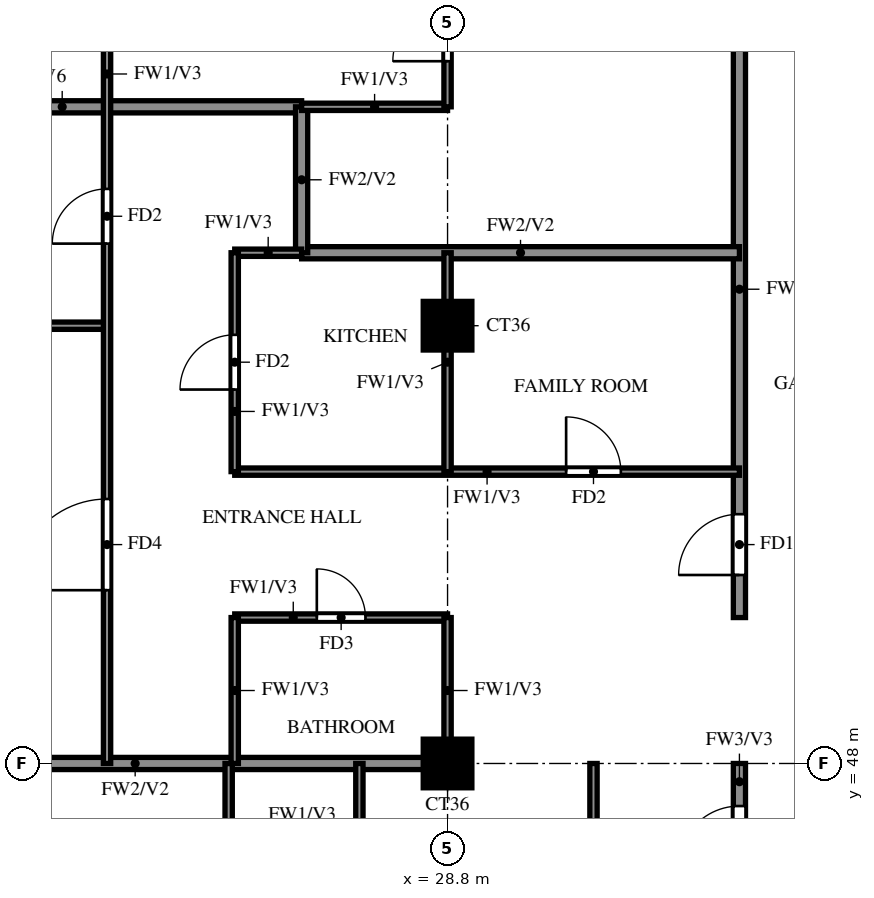
"""IFC4 building model, lengths in metres.
Left out: names, types, materials, properties, quantities, classifications, styles, units other than length and angle.
Written with IfcOpenShell. Run it as: python <this file> out.ifc"""

import sys

from ifc_helpers import new_model, si_unit, direction, frame, frame_2d, origin, origin_2d, place, context, subcontext, project, spatial, rectangle, extrude, source, transform, mapped, element, fill, save


model = new_model("IFC4")
c1 = context("Model", 3, precision=1e-05, world=origin(), true_north=direction((0.0, 1.0)))
c2 = subcontext(c1, "Body", "Model", "MODEL_VIEW")
j1 = project(units=[si_unit("LENGTHUNIT", "METRE"), si_unit("PLANEANGLEUNIT", "RADIAN")], contexts=[c1])
p1 = place(None, origin())
s1 = spatial("IfcSite", under=j1, at=p1, CompositionType="ELEMENT")
p2 = place(p1, origin())
s2 = spatial("IfcBuilding", under=s1, at=p2, CompositionType="ELEMENT")
p3 = place(p2, frame((0.0, 0.0, 232.5)))
s3 = spatial("IfcBuildingStorey", under=s2, at=p3, CompositionType="ELEMENT", Elevation=232.5)
m1 = source(origin(), c2, "Body", "SweptSolid", [
    extrude(rectangle(XDim=0.8, YDim=0.8, at=origin_2d()), origin(), (0.0, 0.0, 1.0), 3.22),
])
for number, where, z_axis, x_axis in (
    (1, (28.8, 48.0, 0.0), (0.0, 0.0, 1.0), (1.0, 0.0, 0.0)),
    (2, (28.8, 55.2, 0.0), (0.0, 0.0, 1.0), (1.0, 0.0, 0.0)),
):
    element("IfcColumn", number, at=place(p3, frame(where, z_axis=z_axis, x_axis=x_axis)), inside=s3, PredefinedType="COLUMN", context=c2, shape_type="MappedRepresentation", body=[
        mapped(m1, transform((0.0, 0.0, 0.0))),
    ])
p4 = place(p3, frame((33.6, 45.6, 0.0), z_axis=(0.0, 0.0, 1.0), x_axis=(0.0, 1.0, 0.0)))
e3 = element("IfcWall", 3, at=p4, inside=s3, PredefinedType="SOLIDWALL", context=c2, shape_type="SweptSolid", body=[
    extrude(rectangle(XDim=2.4, YDim=0.2, at=frame_2d((1.2, 0.0))), origin(), (0.0, 0.0, 1.0), 3.22),
])
p5 = place(p4, frame((0.7, 0.0, 0.0)))
e4 = element("IfcOpeningElement", 4, at=p5, cuts=e3, PredefinedType="OPENING", context=c2, shape_type="SweptSolid", body=[
    extrude(rectangle(XDim=1.0, YDim=2.1, at=frame_2d((0.5, 1.05))), frame((0.0, 0.11, 0.0), z_axis=(0.0, -1.0, 0.0), x_axis=(1.0, 0.0, 0.0)), (0.0, 0.0, 1.0), 0.22),
])
p6 = place(p3, frame((33.6, 50.4, 0.0), z_axis=(0.0, 0.0, 1.0), x_axis=(0.0, 1.0, 0.0)))
e5 = element("IfcWall", 5, at=p6, inside=s3, PredefinedType="SOLIDWALL", context=c2, shape_type="SweptSolid", body=[
    extrude(rectangle(XDim=12.0, YDim=0.2, at=frame_2d((6.0, 0.0))), origin(), (0.0, 0.0, 1.0), 3.22),
])
p7 = place(p6, frame((0.7, 0.0, 0.0)))
e6 = element("IfcOpeningElement", 6, at=p7, cuts=e5, PredefinedType="OPENING", context=c2, shape_type="SweptSolid", body=[
    extrude(rectangle(XDim=1.0, YDim=2.1, at=frame_2d((0.5, 1.05))), frame((0.0, 0.11, 0.0), z_axis=(0.0, -1.0, 0.0), x_axis=(1.0, 0.0, 0.0)), (0.0, 0.0, 1.0), 0.22),
])
p8 = place(p6, frame((9.7, 0.0, 0.0)))
e7 = element("IfcOpeningElement", 7, at=p8, cuts=e5, PredefinedType="OPENING", context=c2, shape_type="SweptSolid", body=[
    extrude(rectangle(XDim=1.0, YDim=2.1, at=frame_2d((0.5, 1.05))), frame((0.0, 0.11, 0.0), z_axis=(0.0, -1.0, 0.0), x_axis=(1.0, 0.0, 0.0)), (0.0, 0.0, 1.0), 0.22),
])
p9 = place(p3, frame((18.525, 48.0, 0.0), z_axis=(0.0, 0.0, 1.0), x_axis=(1.0, 0.0, 0.0)))
e8 = element("IfcWall", 8, at=p9, inside=s3, PredefinedType="SOLIDWALL", context=c2, shape_type="SweptSolid", body=[
    extrude(rectangle(XDim=10.275, YDim=0.2, at=frame_2d((5.138, 0.0))), origin(), (0.0, 0.0, 1.0), 3.22),
])
p10 = place(p3, frame((26.4, 56.4, 0.0), z_axis=(0.0, 0.0, 1.0), x_axis=(1.0, 0.0, 0.0)))
e9 = element("IfcWall", 9, at=p10, inside=s3, PredefinedType="SOLIDWALL", context=c2, shape_type="SweptSolid", body=[
    extrude(rectangle(XDim=7.2, YDim=0.2, at=frame_2d((3.6, 0.0))), origin(), (0.0, 0.0, 1.0), 3.22),
])
p11 = place(p3, frame((18.525, 58.8, 0.0), z_axis=(0.0, 0.0, 1.0), x_axis=(1.0, 0.0, 0.0)))
e10 = element("IfcWall", 10, at=p11, inside=s3, PredefinedType="SOLIDWALL", context=c2, shape_type="SweptSolid", body=[
    extrude(rectangle(XDim=7.875, YDim=0.2, at=frame_2d((3.938, 0.0))), origin(), (0.0, 0.0, 1.0), 2.32),
])
p12 = place(p3, frame((26.4, 56.4, 0.0), z_axis=(0.0, 0.0, 1.0), x_axis=(0.0, 1.0, 0.0)))
e11 = element("IfcWall", 11, at=p12, inside=s3, PredefinedType="SOLIDWALL", context=c2, shape_type="SweptSolid", body=[
    extrude(rectangle(XDim=2.4, YDim=0.2, at=frame_2d((1.2, 0.0))), origin(), (0.0, 0.0, 1.0), 3.22),
])
p13 = place(p3, frame((25.3, 50.4, 0.0), z_axis=(0.0, 0.0, 1.0), x_axis=(1.0, 0.0, 0.0)))
e12 = element("IfcWall", 12, at=p13, inside=s3, PredefinedType="PARTITIONING", context=c2, shape_type="SweptSolid", body=[
    extrude(rectangle(XDim=3.5, YDim=0.12, at=frame_2d((1.75, 0.0))), origin(), (0.0, 0.0, 1.0), 3.22),
])
p14 = place(p13, frame((1.35, 0.0, 0.0)))
e13 = element("IfcOpeningElement", 13, at=p14, cuts=e12, PredefinedType="OPENING", context=c2, shape_type="SweptSolid", body=[
    extrude(rectangle(XDim=0.8, YDim=2.1, at=frame_2d((0.4, 1.05))), frame((0.0, 0.07, 0.0), z_axis=(0.0, -1.0, 0.0), x_axis=(1.0, 0.0, 0.0)), (0.0, 0.0, 1.0), 0.14),
])
p15 = place(p3, frame((25.3, 52.8, 0.0), z_axis=(0.0, 0.0, 1.0), x_axis=(1.0, 0.0, 0.0)))
e14 = element("IfcWall", 14, at=p15, inside=s3, PredefinedType="PARTITIONING", context=c2, shape_type="SweptSolid", body=[
    extrude(rectangle(XDim=8.3, YDim=0.12, at=frame_2d((4.15, 0.0))), origin(), (0.0, 0.0, 1.0), 3.22),
])
p16 = place(p15, frame((5.45, 0.0, 0.0)))
e15 = element("IfcOpeningElement", 15, at=p16, cuts=e14, PredefinedType="OPENING", context=c2, shape_type="SweptSolid", body=[
    extrude(rectangle(XDim=0.9, YDim=2.1, at=frame_2d((0.45, 1.05))), frame((0.0, 0.07, 0.0), z_axis=(0.0, -1.0, 0.0), x_axis=(1.0, 0.0, 0.0)), (0.0, 0.0, 1.0), 0.14),
])
p17 = place(p3, frame((18.525, 55.2, 0.0), z_axis=(0.0, 0.0, 1.0), x_axis=(1.0, 0.0, 0.0)))
e16 = element("IfcWall", 16, at=p17, inside=s3, PredefinedType="PARTITIONING", context=c2, shape_type="SweptSolid", body=[
    extrude(rectangle(XDim=4.675, YDim=0.12, at=frame_2d((2.337, 0.0))), origin(), (0.0, 0.0, 1.0), 3.22),
])
p18 = place(p3, frame((25.3, 56.4, 0.0), z_axis=(0.0, 0.0, 1.0), x_axis=(1.0, 0.0, 0.0)))
e17 = element("IfcWall", 17, at=p18, inside=s3, PredefinedType="PARTITIONING", context=c2, shape_type="SweptSolid", body=[
    extrude(rectangle(XDim=1.1, YDim=0.12, at=frame_2d((0.55, 0.0))), origin(), (0.0, 0.0, 1.0), 3.22),
])
p19 = place(p3, frame((26.4, 58.8, 0.0), z_axis=(0.0, 0.0, 1.0), x_axis=(1.0, 0.0, 0.0)))
e18 = element("IfcWall", 18, at=p19, inside=s3, PredefinedType="PARTITIONING", context=c2, shape_type="SweptSolid", body=[
    extrude(rectangle(XDim=2.4, YDim=0.12, at=frame_2d((1.2, 0.0))), origin(), (0.0, 0.0, 1.0), 3.22),
])
p20 = place(p3, frame((23.2, 48.0, 0.0), z_axis=(0.0, 0.0, 1.0), x_axis=(0.0, 1.0, 0.0)))
e19 = element("IfcWall", 19, at=p20, inside=s3, PredefinedType="PARTITIONING", context=c2, shape_type="SweptSolid", body=[
    extrude(rectangle(XDim=25.2, YDim=0.12, at=frame_2d((12.6, 0.0))), origin(), (0.0, 0.0, 1.0), 3.22),
])
p21 = place(p20, frame((2.85, 0.0, 0.0)))
e20 = element("IfcOpeningElement", 20, at=p21, cuts=e19, PredefinedType="OPENING", context=c2, shape_type="SweptSolid", body=[
    extrude(rectangle(XDim=1.5, YDim=2.1, at=frame_2d((0.75, 1.05))), frame((0.0, 0.07, 0.0), z_axis=(0.0, -1.0, 0.0), x_axis=(1.0, 0.0, 0.0)), (0.0, 0.0, 1.0), 0.14),
])
p22 = place(p20, frame((8.55, 0.0, 0.0)))
e21 = element("IfcOpeningElement", 21, at=p22, cuts=e19, PredefinedType="OPENING", context=c2, shape_type="SweptSolid", body=[
    extrude(rectangle(XDim=0.9, YDim=2.1, at=frame_2d((0.45, 1.05))), frame((0.0, 0.07, 0.0), z_axis=(0.0, -1.0, 0.0), x_axis=(1.0, 0.0, 0.0)), (0.0, 0.0, 1.0), 0.14),
])
p23 = place(p20, frame((12.15, 0.0, 0.0)))
e22 = element("IfcOpeningElement", 22, at=p23, cuts=e19, PredefinedType="OPENING", context=c2, shape_type="SweptSolid", body=[
    extrude(rectangle(XDim=0.9, YDim=2.1, at=frame_2d((0.45, 1.05))), frame((0.0, 0.07, 0.0), z_axis=(0.0, -1.0, 0.0), x_axis=(1.0, 0.0, 0.0)), (0.0, 0.0, 1.0), 0.14),
])
p24 = place(p20, frame((15.75, 0.0, 0.0)))
e23 = element("IfcOpeningElement", 23, at=p24, cuts=e19, PredefinedType="OPENING", context=c2, shape_type="SweptSolid", body=[
    extrude(rectangle(XDim=0.9, YDim=2.1, at=frame_2d((0.45, 1.05))), frame((0.0, 0.07, 0.0), z_axis=(0.0, -1.0, 0.0), x_axis=(1.0, 0.0, 0.0)), (0.0, 0.0, 1.0), 0.14),
])
p25 = place(p20, frame((19.35, 0.0, 0.0)))
e24 = element("IfcOpeningElement", 24, at=p25, cuts=e19, PredefinedType="OPENING", context=c2, shape_type="SweptSolid", body=[
    extrude(rectangle(XDim=0.9, YDim=2.1, at=frame_2d((0.45, 1.05))), frame((0.0, 0.07, 0.0), z_axis=(0.0, -1.0, 0.0), x_axis=(1.0, 0.0, 0.0)), (0.0, 0.0, 1.0), 0.14),
])
p26 = place(p20, frame((22.95, 0.0, 0.0)))
e25 = element("IfcOpeningElement", 25, at=p26, cuts=e19, PredefinedType="OPENING", context=c2, shape_type="SweptSolid", body=[
    extrude(rectangle(XDim=0.9, YDim=2.1, at=frame_2d((0.45, 1.05))), frame((0.0, 0.07, 0.0), z_axis=(0.0, -1.0, 0.0), x_axis=(1.0, 0.0, 0.0)), (0.0, 0.0, 1.0), 0.14),
])
p27 = place(p3, frame((25.2, 39.725, 0.0), z_axis=(0.0, 0.0, 1.0), x_axis=(0.0, 1.0, 0.0)))
e26 = element("IfcWall", 26, at=p27, inside=s3, PredefinedType="PARTITIONING", context=c2, shape_type="SweptSolid", body=[
    extrude(rectangle(XDim=8.275, YDim=0.12, at=frame_2d((4.137, 0.0))), origin(), (0.0, 0.0, 1.0), 3.22),
])
p28 = place(p27, frame((4.525, 0.0, 0.0)))
e27 = element("IfcOpeningElement", 27, at=p28, cuts=e26, PredefinedType="OPENING", context=c2, shape_type="SweptSolid", body=[
    extrude(rectangle(XDim=0.9, YDim=2.1, at=frame_2d((0.45, 1.05))), frame((0.0, 0.07, 0.0), z_axis=(0.0, -1.0, 0.0), x_axis=(1.0, 0.0, 0.0)), (0.0, 0.0, 1.0), 0.14),
])
p29 = place(p3, frame((25.3, 48.0, 0.0), z_axis=(0.0, 0.0, 1.0), x_axis=(0.0, 1.0, 0.0)))
e28 = element("IfcWall", 28, at=p29, inside=s3, PredefinedType="PARTITIONING", context=c2, shape_type="SweptSolid", body=[
    extrude(rectangle(XDim=2.4, YDim=0.12, at=frame_2d((1.2, 0.0))), origin(), (0.0, 0.0, 1.0), 3.22),
])
p30 = place(p3, frame((25.3, 52.8, 0.0), z_axis=(0.0, 0.0, 1.0), x_axis=(0.0, 1.0, 0.0)))
e29 = element("IfcWall", 29, at=p30, inside=s3, PredefinedType="PARTITIONING", context=c2, shape_type="SweptSolid", body=[
    extrude(rectangle(XDim=3.6, YDim=0.12, at=frame_2d((1.8, 0.0))), origin(), (0.0, 0.0, 1.0), 3.22),
])
p31 = place(p30, frame((1.35, 0.0, 0.0)))
e30 = element("IfcOpeningElement", 30, at=p31, cuts=e29, PredefinedType="OPENING", context=c2, shape_type="SweptSolid", body=[
    extrude(rectangle(XDim=0.9, YDim=2.1, at=frame_2d((0.45, 1.05))), frame((0.0, 0.07, 0.0), z_axis=(0.0, -1.0, 0.0), x_axis=(1.0, 0.0, 0.0)), (0.0, 0.0, 1.0), 0.14),
])
for number, where, z_axis, x_axis in (
    (31, (27.35, 45.6, 0.0), (0.0, 0.0, 1.0), (0.0, 1.0, 0.0)),
    (32, (28.8, 48.0, 0.0), (0.0, 0.0, 1.0), (0.0, 1.0, 0.0)),
):
    element("IfcWall", number, at=place(p3, frame(where, z_axis=z_axis, x_axis=x_axis)), inside=s3, PredefinedType="PARTITIONING", context=c2, shape_type="SweptSolid", body=[
        extrude(rectangle(XDim=2.4, YDim=0.12, at=frame_2d((1.2, 0.0))), origin(), (0.0, 0.0, 1.0), 3.22),
    ])
p32 = place(p3, frame((28.8, 52.8, 0.0), z_axis=(0.0, 0.0, 1.0), x_axis=(0.0, 1.0, 0.0)))
e33 = element("IfcWall", 33, at=p32, inside=s3, PredefinedType="PARTITIONING", context=c2, shape_type="SweptSolid", body=[
    extrude(rectangle(XDim=3.6, YDim=0.12, at=frame_2d((1.8, 0.0))), origin(), (0.0, 0.0, 1.0), 3.22),
])
p33 = place(p3, frame((28.8, 58.8, 0.0), z_axis=(0.0, 0.0, 1.0), x_axis=(0.0, 1.0, 0.0)))
e34 = element("IfcWall", 34, at=p33, inside=s3, PredefinedType="PARTITIONING", context=c2, shape_type="SweptSolid", body=[
    extrude(rectangle(XDim=3.6, YDim=0.12, at=frame_2d((1.8, 0.0))), origin(), (0.0, 0.0, 1.0), 3.22),
])
p34 = place(p33, frame((0.75, 0.0, 0.0)))
e35 = element("IfcOpeningElement", 35, at=p34, cuts=e34, PredefinedType="OPENING", context=c2, shape_type="SweptSolid", body=[
    extrude(rectangle(XDim=0.9, YDim=2.1, at=frame_2d((0.45, 1.05))), frame((0.0, 0.07, 0.0), z_axis=(0.0, -1.0, 0.0), x_axis=(1.0, 0.0, 0.0)), (0.0, 0.0, 1.0), 0.14),
])
p35 = place(p3, frame((31.2, 45.6, 0.0), z_axis=(0.0, 0.0, 1.0), x_axis=(0.0, 1.0, 0.0)))
e36 = element("IfcWall", 36, at=p35, inside=s3, PredefinedType="PARTITIONING", context=c2, shape_type="SweptSolid", body=[
    extrude(rectangle(XDim=2.4, YDim=0.12, at=frame_2d((1.2, 0.0))), origin(), (0.0, 0.0, 1.0), 3.22),
])
p36 = place(p5, origin())
e37 = element("IfcDoor", 37, at=p36, inside=s3, OperationType="SINGLE_SWING_LEFT", PredefinedType="DOOR", context=c2, shape_type="SweptSolid", body=[
    extrude(rectangle(XDim=1.0, YDim=2.1, at=frame_2d((0.5, 1.05))), frame((0.0, 0.025, 0.0), z_axis=(0.0, -1.0, 0.0), x_axis=(1.0, 0.0, 0.0)), (0.0, 0.0, 1.0), 0.05),
])
fill(e4, e37)
p37 = place(p7, origin())
e38 = element("IfcDoor", 38, at=p37, inside=s3, OperationType="SINGLE_SWING_RIGHT", PredefinedType="DOOR", context=c2, shape_type="SweptSolid", body=[
    extrude(rectangle(XDim=1.0, YDim=2.1, at=frame_2d((0.5, 1.05))), frame((0.0, 0.025, 0.0), z_axis=(0.0, -1.0, 0.0), x_axis=(1.0, 0.0, 0.0)), (0.0, 0.0, 1.0), 0.05),
])
fill(e6, e38)
p38 = place(p21, origin())
e39 = element("IfcDoor", 39, at=p38, inside=s3, OperationType="SINGLE_SWING_LEFT", PredefinedType="DOOR", context=c2, shape_type="SweptSolid", body=[
    extrude(rectangle(XDim=1.5, YDim=2.1, at=frame_2d((0.75, 1.05))), frame((0.0, 0.025, 0.0), z_axis=(0.0, -1.0, 0.0), x_axis=(1.0, 0.0, 0.0)), (0.0, 0.0, 1.0), 0.05),
])
fill(e20, e39)
p39 = place(p22, origin())
e40 = element("IfcDoor", 40, at=p39, inside=s3, OperationType="SINGLE_SWING_LEFT", PredefinedType="DOOR", context=c2, shape_type="SweptSolid", body=[
    extrude(rectangle(XDim=0.9, YDim=2.1, at=frame_2d((0.45, 1.05))), frame((0.0, 0.025, 0.0), z_axis=(0.0, -1.0, 0.0), x_axis=(1.0, 0.0, 0.0)), (0.0, 0.0, 1.0), 0.05),
])
fill(e21, e40)
p40 = place(p14, origin())
e41 = element("IfcDoor", 41, at=p40, inside=s3, OperationType="SINGLE_SWING_RIGHT", PredefinedType="DOOR", context=c2, shape_type="SweptSolid", body=[
    extrude(rectangle(XDim=0.8, YDim=2.1, at=frame_2d((0.4, 1.05))), frame((0.0, 0.025, 0.0), z_axis=(0.0, -1.0, 0.0), x_axis=(1.0, 0.0, 0.0)), (0.0, 0.0, 1.0), 0.05),
])
fill(e13, e41)
p41 = place(p31, origin())
e42 = element("IfcDoor", 42, at=p41, inside=s3, OperationType="SINGLE_SWING_LEFT", PredefinedType="DOOR", context=c2, shape_type="SweptSolid", body=[
    extrude(rectangle(XDim=0.9, YDim=2.1, at=frame_2d((0.45, 1.05))), frame((0.0, 0.025, 0.0), z_axis=(0.0, -1.0, 0.0), x_axis=(1.0, 0.0, 0.0)), (0.0, 0.0, 1.0), 0.05),
])
fill(e30, e42)
p42 = place(p16, origin())
e43 = element("IfcDoor", 43, at=p42, inside=s3, OperationType="SINGLE_SWING_LEFT", PredefinedType="DOOR", context=c2, shape_type="SweptSolid", body=[
    extrude(rectangle(XDim=0.9, YDim=2.1, at=frame_2d((0.45, 1.05))), frame((0.0, 0.025, 0.0), z_axis=(0.0, -1.0, 0.0), x_axis=(1.0, 0.0, 0.0)), (0.0, 0.0, 1.0), 0.05),
])
fill(e15, e43)
p43 = place(p34, origin())
e44 = element("IfcDoor", 44, at=p43, inside=s3, OperationType="SINGLE_SWING_RIGHT", PredefinedType="DOOR", context=c2, shape_type="SweptSolid", body=[
    extrude(rectangle(XDim=0.9, YDim=2.1, at=frame_2d((0.45, 1.05))), frame((0.0, 0.025, 0.0), z_axis=(0.0, -1.0, 0.0), x_axis=(1.0, 0.0, 0.0)), (0.0, 0.0, 1.0), 0.05),
])
fill(e35, e44)
save(model, sys.argv[1])
